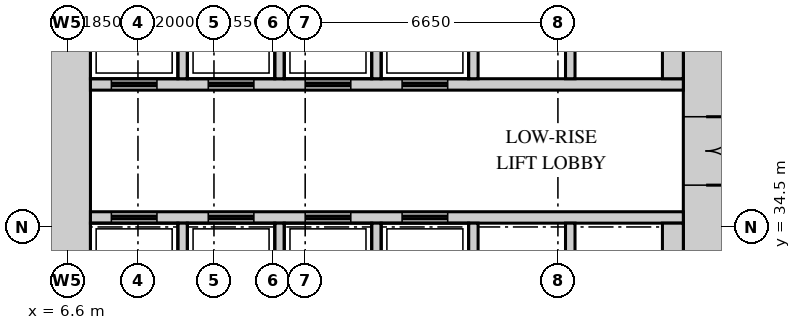
"""IFC4 building model, lengths in metres.
Left out: names, types, materials, properties, quantities, classifications, styles, units other than length and angle.
Written with IfcOpenShell. Run it as: python <this file> out.ifc"""

import sys

from ifc_helpers import new_model, si_unit, direction, frame, frame_2d, origin, place, context, subcontext, project, spatial, rectangle, extrude, source, transform, mapped, element, fill, save


model = new_model("IFC4")
c1 = context("Model", 3, precision=1e-05, world=origin(), true_north=direction((0.0, 1.0)))
c2 = subcontext(c1, "Body", "Model", "MODEL_VIEW")
j1 = project(units=[si_unit("LENGTHUNIT", "METRE"), si_unit("PLANEANGLEUNIT", "RADIAN")], contexts=[c1])
p1 = place(None, origin())
s1 = spatial("IfcSite", under=j1, at=p1, CompositionType="ELEMENT")
p2 = place(p1, origin())
s2 = spatial("IfcBuilding", under=s1, at=p2, CompositionType="ELEMENT")
p3 = place(p2, frame((0.0, 0.0, 28.5)))
s3 = spatial("IfcBuildingStorey", under=s2, at=p3, CompositionType="ELEMENT", Elevation=28.5)
m1 = source(origin(), c2, "Body", "SweptSolid", [
    extrude(rectangle(XDim=27.6, YDim=1.2, at=frame_2d((13.8, 0.0))), origin(), (0.0, 0.0, 1.0), 4.0),
])
p4 = place(p3, frame((23.4, 13.2, 0.0), z_axis=(0.0, 0.0, 1.0), x_axis=(0.0, 1.0, 0.0)))
e1 = element("IfcWall", 1, at=p4, inside=s3, PredefinedType="SHEAR", context=c2, shape_type="MappedRepresentation", body=[
    mapped(m1, transform((0.0, 0.0, 0.0))),
])
m2 = source(origin(), c2, "Body", "SweptSolid", [
    extrude(rectangle(XDim=1.8, YDim=2.1, at=frame_2d((0.9, 1.05))), frame((0.0, 0.61, 0.0), z_axis=(0.0, -1.0, 0.0), x_axis=(1.0, 0.0, 0.0)), (0.0, 0.0, 1.0), 1.22),
])
p5 = place(p4, frame((22.4, 0.0, 0.0)))
e2 = element("IfcOpeningElement", 2, at=p5, cuts=e1, PredefinedType="OPENING", context=c2, shape_type="MappedRepresentation", body=[
    mapped(m2, transform((0.0, 0.0, 0.0))),
])
m3 = source(origin(), c2, "Body", "SweptSolid", [
    extrude(rectangle(XDim=1.2, YDim=2.1, at=frame_2d((0.6, 1.05))), frame((0.0, 0.61, 0.0), z_axis=(0.0, -1.0, 0.0), x_axis=(1.0, 0.0, 0.0)), (0.0, 0.0, 1.0), 1.22),
])
p6 = place(p4, frame((13.65, 0.0, 0.0)))
e3 = element("IfcOpeningElement", 3, at=p6, cuts=e1, PredefinedType="OPENING", context=c2, shape_type="MappedRepresentation", body=[
    mapped(m3, transform((0.0, 0.0, 0.0))),
])
m4 = source(origin(), c2, "Body", "SweptSolid", [
    extrude(rectangle(XDim=0.9, YDim=2.1, at=frame_2d((0.45, 1.05))), frame((0.0, 0.61, 0.0), z_axis=(0.0, -1.0, 0.0), x_axis=(1.0, 0.0, 0.0)), (0.0, 0.0, 1.0), 1.22),
])
p7 = place(p4, frame((0.8, 0.0, 0.0)))
e4 = element("IfcOpeningElement", 4, at=p7, cuts=e1, PredefinedType="OPENING", context=c2, shape_type="MappedRepresentation", body=[
    mapped(m4, transform((0.0, 0.0, 0.0))),
])
p8 = place(p4, frame((3.8, 0.0, 0.0)))
e5 = element("IfcOpeningElement", 5, at=p8, cuts=e1, PredefinedType="OPENING", context=c2, shape_type="MappedRepresentation", body=[
    mapped(m4, transform((0.0, 0.0, 0.0))),
])
p9 = place(p4, frame((7.4, 0.0, 0.0)))
e6 = element("IfcOpeningElement", 6, at=p9, cuts=e1, PredefinedType="OPENING", context=c2, shape_type="MappedRepresentation", body=[
    mapped(m4, transform((0.0, 0.0, 0.0))),
])
p10 = place(p3, frame((6.6, 13.2, 0.0), z_axis=(0.0, 0.0, 1.0), x_axis=(0.0, 1.0, 0.0)))
e7 = element("IfcWall", 7, at=p10, inside=s3, PredefinedType="SHEAR", context=c2, shape_type="MappedRepresentation", body=[
    mapped(m1, transform((0.0, 0.0, 0.0))),
])
m5 = source(origin(), c2, "Body", "SweptSolid", [
    extrude(rectangle(XDim=15.6, YDim=0.3, at=frame_2d((7.8, 0.0))), origin(), (0.0, 0.0, 1.0), 4.0),
])
p11 = place(p3, frame((7.2, 38.25, 0.0), z_axis=(0.0, 0.0, 1.0), x_axis=(1.0, 0.0, 0.0)))
e8 = element("IfcWall", 8, at=p11, inside=s3, PredefinedType="STANDARD", context=c2, shape_type="MappedRepresentation", body=[
    mapped(m5, transform((0.0, 0.0, 0.0))),
])
m6 = source(origin(), c2, "Body", "SweptSolid", [
    extrude(rectangle(XDim=1.2, YDim=2.1, at=frame_2d((0.6, 1.05))), frame((0.0, 0.16, 0.0), z_axis=(0.0, -1.0, 0.0), x_axis=(1.0, 0.0, 0.0)), (0.0, 0.0, 1.0), 0.32),
])
p12 = place(p11, frame((0.55, 0.0, 0.0)))
e9 = element("IfcOpeningElement", 9, at=p12, cuts=e8, PredefinedType="OPENING", context=c2, shape_type="MappedRepresentation", body=[
    mapped(m6, transform((0.0, 0.0, 0.0))),
])
p13 = place(p11, frame((3.1, 0.0, 0.0)))
e10 = element("IfcOpeningElement", 10, at=p13, cuts=e8, PredefinedType="OPENING", context=c2, shape_type="MappedRepresentation", body=[
    mapped(m6, transform((0.0, 0.0, 0.0))),
])
p14 = place(p11, frame((5.65, 0.0, 0.0)))
e11 = element("IfcOpeningElement", 11, at=p14, cuts=e8, PredefinedType="OPENING", context=c2, shape_type="MappedRepresentation", body=[
    mapped(m6, transform((0.0, 0.0, 0.0))),
])
p15 = place(p11, frame((8.2, 0.0, 0.0)))
e12 = element("IfcOpeningElement", 12, at=p15, cuts=e8, PredefinedType="OPENING", context=c2, shape_type="MappedRepresentation", body=[
    mapped(m6, transform((0.0, 0.0, 0.0))),
])
p16 = place(p3, frame((7.2, 34.75, 0.0), z_axis=(0.0, 0.0, 1.0), x_axis=(1.0, 0.0, 0.0)))
e13 = element("IfcWall", 13, at=p16, inside=s3, PredefinedType="STANDARD", context=c2, shape_type="MappedRepresentation", body=[
    mapped(m5, transform((0.0, 0.0, 0.0))),
])
p17 = place(p16, frame((0.55, 0.0, 0.0)))
e14 = element("IfcOpeningElement", 14, at=p17, cuts=e13, PredefinedType="OPENING", context=c2, shape_type="MappedRepresentation", body=[
    mapped(m6, transform((0.0, 0.0, 0.0))),
])
p18 = place(p16, frame((3.1, 0.0, 0.0)))
e15 = element("IfcOpeningElement", 15, at=p18, cuts=e13, PredefinedType="OPENING", context=c2, shape_type="MappedRepresentation", body=[
    mapped(m6, transform((0.0, 0.0, 0.0))),
])
p19 = place(p16, frame((5.65, 0.0, 0.0)))
e16 = element("IfcOpeningElement", 16, at=p19, cuts=e13, PredefinedType="OPENING", context=c2, shape_type="MappedRepresentation", body=[
    mapped(m6, transform((0.0, 0.0, 0.0))),
])
p20 = place(p16, frame((8.2, 0.0, 0.0)))
e17 = element("IfcOpeningElement", 17, at=p20, cuts=e13, PredefinedType="OPENING", context=c2, shape_type="MappedRepresentation", body=[
    mapped(m6, transform((0.0, 0.0, 0.0))),
])
m7 = source(origin(), c2, "Body", "SweptSolid", [
    extrude(rectangle(XDim=2.4, YDim=0.25, at=frame_2d((1.2, 0.0))), origin(), (0.0, 0.0, 1.0), 4.0),
])
for number, where, z_axis, x_axis in (
    (18, (9.625, 38.4, 0.0), (0.0, 0.0, 1.0), (0.0, 1.0, 0.0)),
    (19, (12.175, 38.4, 0.0), (0.0, 0.0, 1.0), (0.0, 1.0, 0.0)),
    (20, (14.725, 38.4, 0.0), (0.0, 0.0, 1.0), (0.0, 1.0, 0.0)),
    (21, (17.275, 38.4, 0.0), (0.0, 0.0, 1.0), (0.0, 1.0, 0.0)),
    (22, (19.825, 38.4, 0.0), (0.0, 0.0, 1.0), (0.0, 1.0, 0.0)),
):
    element("IfcWall", number, at=place(p3, frame(where, z_axis=z_axis, x_axis=x_axis)), inside=s3, PredefinedType="STANDARD", context=c2, shape_type="MappedRepresentation", body=[
        mapped(m7, transform((0.0, 0.0, 0.0))),
    ])
m8 = source(origin(), c2, "Body", "SweptSolid", [
    extrude(rectangle(XDim=2.4, YDim=0.55, at=frame_2d((1.2, 0.0))), origin(), (0.0, 0.0, 1.0), 4.0),
])
p21 = place(p3, frame((22.525, 38.4, 0.0), z_axis=(0.0, 0.0, 1.0), x_axis=(0.0, 1.0, 0.0)))
e23 = element("IfcWall", 23, at=p21, inside=s3, PredefinedType="STANDARD", context=c2, shape_type="MappedRepresentation", body=[
    mapped(m8, transform((0.0, 0.0, 0.0))),
])
for number, where, z_axis, x_axis in (
    (24, (9.625, 32.2, 0.0), (0.0, 0.0, 1.0), (0.0, 1.0, 0.0)),
    (25, (12.175, 32.2, 0.0), (0.0, 0.0, 1.0), (0.0, 1.0, 0.0)),
    (26, (14.725, 32.2, 0.0), (0.0, 0.0, 1.0), (0.0, 1.0, 0.0)),
    (27, (17.275, 32.2, 0.0), (0.0, 0.0, 1.0), (0.0, 1.0, 0.0)),
    (28, (19.825, 32.2, 0.0), (0.0, 0.0, 1.0), (0.0, 1.0, 0.0)),
):
    element("IfcWall", number, at=place(p3, frame(where, z_axis=z_axis, x_axis=x_axis)), inside=s3, PredefinedType="STANDARD", context=c2, shape_type="MappedRepresentation", body=[
        mapped(m7, transform((0.0, 0.0, 0.0))),
    ])
p22 = place(p3, frame((22.525, 32.2, 0.0), z_axis=(0.0, 0.0, 1.0), x_axis=(0.0, 1.0, 0.0)))
e29 = element("IfcWall", 29, at=p22, inside=s3, PredefinedType="STANDARD", context=c2, shape_type="MappedRepresentation", body=[
    mapped(m8, transform((0.0, 0.0, 0.0))),
])
m9 = source(origin(), c2, "Body", "SweptSolid", [
    extrude(rectangle(XDim=1.8, YDim=2.1, at=frame_2d((0.9, 1.05))), frame((0.0, 0.55, 0.0), z_axis=(0.0, -1.0, 0.0), x_axis=(1.0, 0.0, 0.0)), (0.0, 0.0, 1.0), 1.1),
])
p23 = place(p5, origin())
e30 = element("IfcDoor", 30, at=p23, inside=s3, OperationType="DOUBLE_DOOR_SINGLE_SWING", PredefinedType="DOOR", context=c2, shape_type="MappedRepresentation", body=[
    mapped(m9, transform((0.0, 0.0, 0.0))),
])
fill(e2, e30)
m10 = source(origin(), c2, "Body", "SweptSolid", [
    extrude(rectangle(XDim=1.2, YDim=2.1, at=frame_2d((0.6, 1.05))), frame((0.0, 0.025, 0.0), z_axis=(0.0, -1.0, 0.0), x_axis=(1.0, 0.0, 0.0)), (0.0, 0.0, 1.0), 0.05),
])
p24 = place(p17, origin())
e31 = element("IfcDoor", 31, at=p24, inside=s3, OperationType="DOUBLE_DOOR_SLIDING", PredefinedType="DOOR", context=c2, shape_type="MappedRepresentation", body=[
    mapped(m10, transform((0.0, 0.0, 0.0))),
])
fill(e14, e31)
p25 = place(p18, origin())
e32 = element("IfcDoor", 32, at=p25, inside=s3, OperationType="DOUBLE_DOOR_SLIDING", PredefinedType="DOOR", context=c2, shape_type="MappedRepresentation", body=[
    mapped(m10, transform((0.0, 0.0, 0.0))),
])
fill(e15, e32)
p26 = place(p19, origin())
e33 = element("IfcDoor", 33, at=p26, inside=s3, OperationType="DOUBLE_DOOR_SLIDING", PredefinedType="DOOR", context=c2, shape_type="MappedRepresentation", body=[
    mapped(m10, transform((0.0, 0.0, 0.0))),
])
fill(e16, e33)
p27 = place(p20, origin())
e34 = element("IfcDoor", 34, at=p27, inside=s3, OperationType="DOUBLE_DOOR_SLIDING", PredefinedType="DOOR", context=c2, shape_type="MappedRepresentation", body=[
    mapped(m10, transform((0.0, 0.0, 0.0))),
])
fill(e17, e34)
p28 = place(p12, origin())
e35 = element("IfcDoor", 35, at=p28, inside=s3, OperationType="DOUBLE_DOOR_SLIDING", PredefinedType="DOOR", context=c2, shape_type="MappedRepresentation", body=[
    mapped(m10, transform((0.0, 0.0, 0.0))),
])
fill(e9, e35)
p29 = place(p13, origin())
e36 = element("IfcDoor", 36, at=p29, inside=s3, OperationType="DOUBLE_DOOR_SLIDING", PredefinedType="DOOR", context=c2, shape_type="MappedRepresentation", body=[
    mapped(m10, transform((0.0, 0.0, 0.0))),
])
fill(e10, e36)
p30 = place(p14, origin())
e37 = element("IfcDoor", 37, at=p30, inside=s3, OperationType="DOUBLE_DOOR_SLIDING", PredefinedType="DOOR", context=c2, shape_type="MappedRepresentation", body=[
    mapped(m10, transform((0.0, 0.0, 0.0))),
])
fill(e11, e37)
p31 = place(p15, origin())
e38 = element("IfcDoor", 38, at=p31, inside=s3, OperationType="DOUBLE_DOOR_SLIDING", PredefinedType="DOOR", context=c2, shape_type="MappedRepresentation", body=[
    mapped(m10, transform((0.0, 0.0, 0.0))),
])
fill(e12, e38)
save(model, sys.argv[1])
